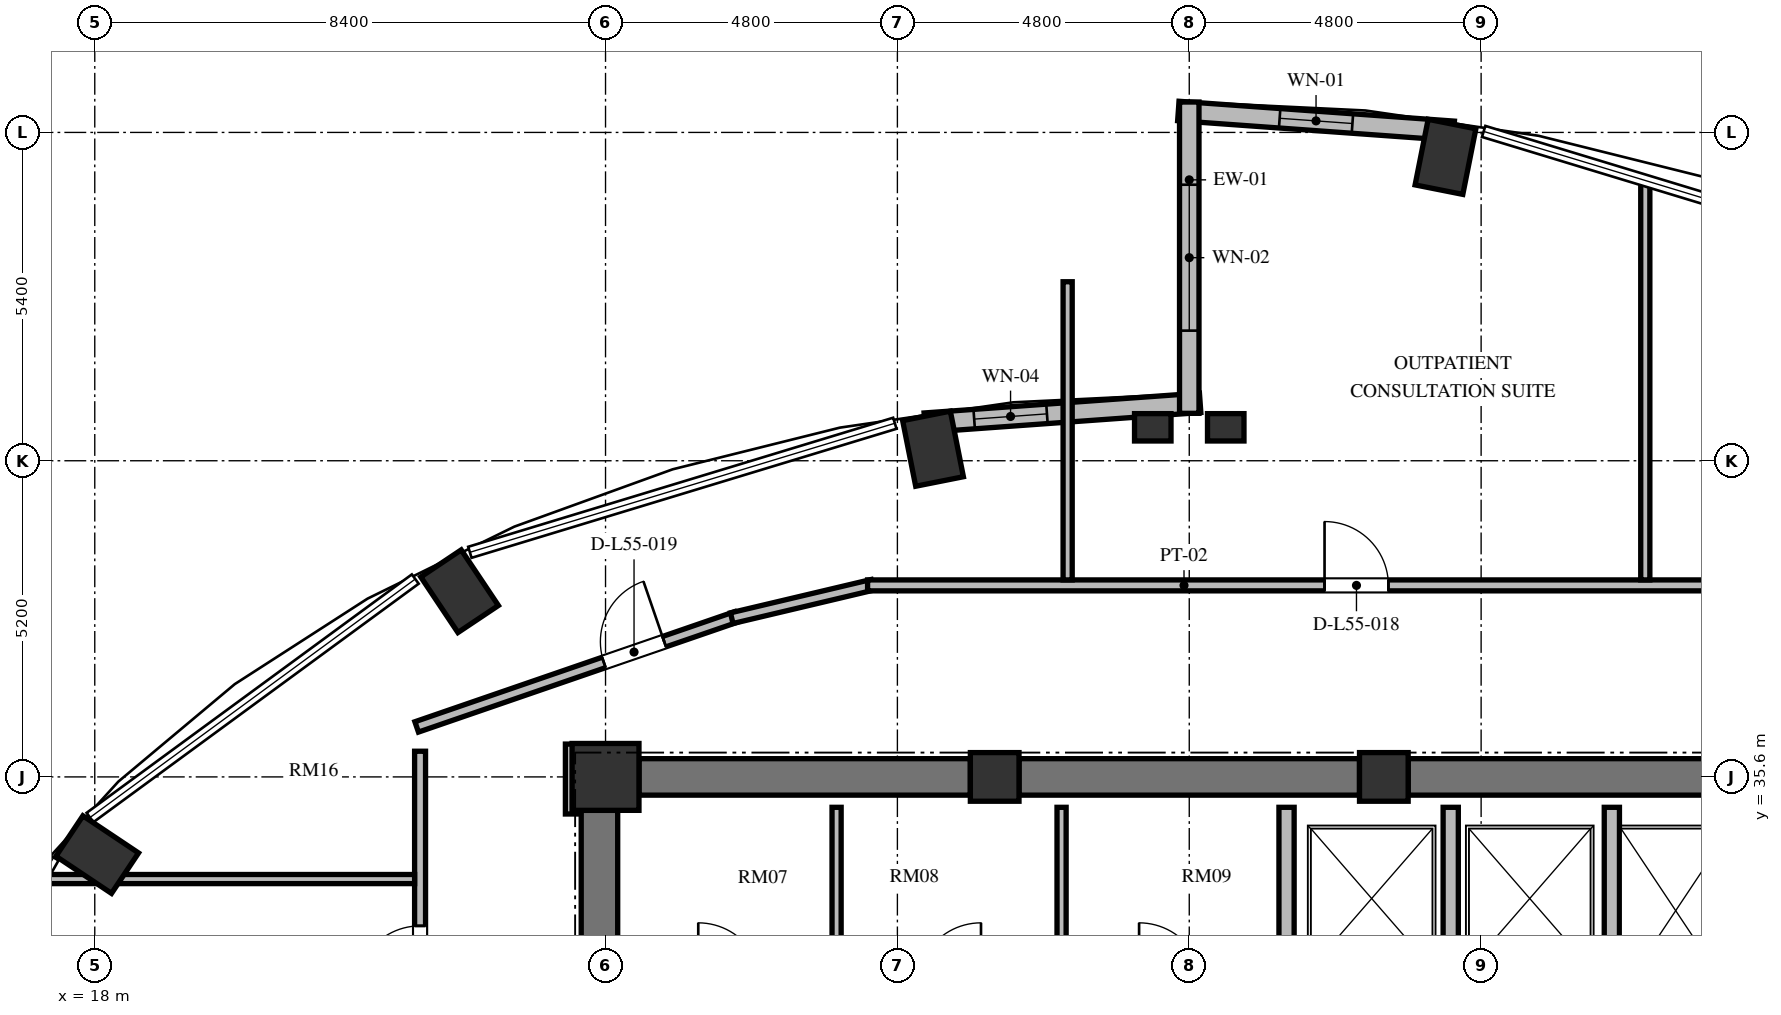
"""IFC4 building model, lengths in metres.
Left out: names, types, materials, properties, quantities, classifications, styles, units other than length and angle.
Written with IfcOpenShell. Run it as: python <this file> out.ifc"""

import sys

from ifc_helpers import new_model, si_unit, direction, frame, frame_2d, origin, origin_2d, place, context, subcontext, project, spatial, rectangle, extrude, element, fill, save


model = new_model("IFC4")
c1 = context("Model", 3, precision=1e-05, world=origin(), true_north=direction((0.0, 1.0)))
c2 = subcontext(c1, "Body", "Model", "MODEL_VIEW")
j1 = project(units=[si_unit("LENGTHUNIT", "METRE"), si_unit("PLANEANGLEUNIT", "RADIAN")], contexts=[c1])
p1 = place(None, origin())
s1 = spatial("IfcSite", under=j1, at=p1, CompositionType="ELEMENT")
p2 = place(p1, origin())
s2 = spatial("IfcBuilding", under=s1, at=p2, CompositionType="ELEMENT")
p3 = place(p2, frame((0.0, 0.0, 213.072)))
s3 = spatial("IfcBuildingStorey", under=s2, at=p3, CompositionType="ELEMENT", Elevation=213.072)
for number, where, z_axis, x_axis in (
    (1, (40.214, 45.798, 0.0), (0.0, 0.0, 1.0), (0.195, 0.981, 0.0)),
    (2, (31.786, 40.998, 0.0), (0.0, 0.0, 1.0), (-0.195, 0.981, 0.0)),
    (3, (24.0, 38.654, 0.0), (0.0, 0.0, 1.0), (-0.556, 0.831, 0.0)),
    (4, (18.04, 34.323, 0.0), (0.0, 0.0, 1.0), (-0.831, 0.556, 0.0)),
):
    element("IfcColumn", number, at=place(p3, frame(where, z_axis=z_axis, x_axis=x_axis)), inside=s3, PredefinedType="COLUMN", context=c2, shape_type="SweptSolid", body=[
        extrude(rectangle(XDim=1.1, YDim=0.8, at=origin_2d()), origin(), (0.0, 0.0, 1.0), 3.648),
    ])
for number, where, z_axis, x_axis in (
    (5, (39.2, 35.6, 0.0), (0.0, 0.0, 1.0), (1.0, 0.0, 0.0)),
    (6, (32.8, 35.6, 0.0), (0.0, 0.0, 1.0), (1.0, 0.0, 0.0)),
):
    element("IfcColumn", number, at=place(p3, frame(where, z_axis=z_axis, x_axis=x_axis)), inside=s3, PredefinedType="COLUMN", context=c2, shape_type="SweptSolid", body=[
        extrude(rectangle(XDim=0.8, YDim=0.8, at=origin_2d()), origin(), (0.0, 0.0, 1.0), 3.648),
    ])
p4 = place(p3, frame((26.4, 35.6, 0.0), z_axis=(0.0, 0.0, 1.0), x_axis=(1.0, 0.0, 0.0)))
e7 = element("IfcColumn", 7, at=p4, inside=s3, PredefinedType="COLUMN", context=c2, shape_type="SweptSolid", body=[
    extrude(rectangle(XDim=1.1, YDim=1.1, at=origin_2d()), origin(), (0.0, 0.0, 1.0), 3.648),
])
for number, where, z_axis, x_axis in (
    (8, (35.4, 41.35, 0.0), (0.0, 0.0, 1.0), (1.0, 0.0, 0.0)),
    (9, (36.6, 41.35, 0.0), (0.0, 0.0, 1.0), (1.0, 0.0, 0.0)),
):
    element("IfcColumn", number, at=place(p3, frame(where, z_axis=z_axis, x_axis=x_axis)), inside=s3, PredefinedType="PILASTER", context=c2, shape_type="SweptSolid", body=[
        extrude(rectangle(XDim=0.6, YDim=0.45, at=origin_2d()), origin(), (0.0, 0.0, 1.0), 3.648),
    ])
p5 = place(p3, frame((26.3, 20.95, 0.0), z_axis=(0.0, 0.0, 1.0), x_axis=(0.0, 1.0, 0.0)))
e10 = element("IfcWall", 10, at=p5, inside=s3, PredefinedType="SHEAR", context=c2, shape_type="SweptSolid", body=[
    extrude(rectangle(XDim=14.1, YDim=0.6, at=frame_2d((7.05, 0.0))), origin(), (0.0, 0.0, 1.0), 3.648),
])
p6 = place(p5, frame((6.5, 0.0, 0.0)))
e11 = element("IfcOpeningElement", 11, at=p6, cuts=e10, PredefinedType="OPENING", context=c2, shape_type="SweptSolid", body=[
    extrude(rectangle(XDim=1.2, YDim=2.15, at=frame_2d((0.6, 1.075))), frame((0.0, 0.31, 0.0), z_axis=(0.0, -1.0, 0.0), x_axis=(1.0, 0.0, 0.0)), (0.0, 0.0, 1.0), 0.62),
])
p7 = place(p5, frame((9.6, 0.0, 0.0)))
e12 = element("IfcOpeningElement", 12, at=p7, cuts=e10, PredefinedType="OPENING", context=c2, shape_type="SweptSolid", body=[
    extrude(rectangle(XDim=1.3, YDim=2.2, at=frame_2d((0.65, 1.1))), frame((0.0, 0.31, 0.0), z_axis=(0.0, -1.0, 0.0), x_axis=(1.0, 0.0, 0.0)), (0.0, 0.0, 1.0), 0.62),
])
p8 = place(p5, frame((3.26, 0.0, 0.0)))
e13 = element("IfcOpeningElement", 13, at=p8, cuts=e10, PredefinedType="OPENING", context=c2, shape_type="SweptSolid", body=[
    extrude(rectangle(XDim=1.3, YDim=2.2, at=frame_2d((0.65, 1.1))), frame((0.0, 0.31, 0.0), z_axis=(0.0, -1.0, 0.0), x_axis=(1.0, 0.0, 0.0)), (0.0, 0.0, 1.0), 0.62),
])
p9 = place(p3, frame((26.95, 35.6, 0.0), z_axis=(0.0, 0.0, 1.0), x_axis=(1.0, 0.0, 0.0)))
e14 = element("IfcWall", 14, at=p9, inside=s3, PredefinedType="SHEAR", context=c2, shape_type="SweptSolid", body=[
    extrude(rectangle(XDim=5.45, YDim=0.6, at=frame_2d((2.725, 0.0))), origin(), (0.0, 0.0, 1.0), 3.648),
])
p10 = place(p3, frame((33.2, 35.6, 0.0), z_axis=(0.0, 0.0, 1.0), x_axis=(1.0, 0.0, 0.0)))
e15 = element("IfcWall", 15, at=p10, inside=s3, PredefinedType="SHEAR", context=c2, shape_type="SweptSolid", body=[
    extrude(rectangle(XDim=5.6, YDim=0.6, at=frame_2d((2.8, 0.0))), origin(), (0.0, 0.0, 1.0), 3.648),
])
p11 = place(p3, frame((39.6, 35.6, 0.0), z_axis=(0.0, 0.0, 1.0), x_axis=(1.0, 0.0, 0.0)))
e16 = element("IfcWall", 16, at=p11, inside=s3, PredefinedType="SHEAR", context=c2, shape_type="SweptSolid", body=[
    extrude(rectangle(XDim=5.45, YDim=0.6, at=frame_2d((2.725, 0.0))), origin(), (0.0, 0.0, 1.0), 3.648),
])
p12 = place(p3, frame((40.35, 46.226, 0.0), z_axis=(0.0, 0.0, 1.0), x_axis=(-0.997409061056, 0.071938619141, 0.0)))
e17 = element("IfcWall", 17, at=p12, inside=s3, PredefinedType="SOLIDWALL", context=c2, shape_type="SweptSolid", body=[
    extrude(rectangle(XDim=4.541, YDim=0.32, at=frame_2d((2.271, 0.0))), origin(), (0.0, 0.0, 1.0), 3.448),
])
p13 = place(p12, frame((1.67, 0.0, 0.85)))
e18 = element("IfcOpeningElement", 18, at=p13, cuts=e17, PredefinedType="OPENING", context=c2, shape_type="SweptSolid", body=[
    extrude(rectangle(XDim=1.2, YDim=2.2, at=frame_2d((0.6, 1.1))), frame((0.0, 0.17, 0.0), z_axis=(0.0, -1.0, 0.0), x_axis=(1.0, 0.0, 0.0)), (0.0, 0.0, 1.0), 0.34),
])
p14 = place(p3, frame((36.179, 41.753, 0.0), z_axis=(0.0, 0.0, 1.0), x_axis=(-0.997408782787, -0.071942477163, 0.0)))
e19 = element("IfcWall", 19, at=p14, inside=s3, PredefinedType="SOLIDWALL", context=c2, shape_type="SweptSolid", body=[
    extrude(rectangle(XDim=4.541, YDim=0.32, at=frame_2d((2.27, 0.0))), origin(), (0.0, 0.0, 1.0), 3.448),
])
p15 = place(p14, frame((2.526, 0.0, 0.85)))
e20 = element("IfcOpeningElement", 20, at=p15, cuts=e19, PredefinedType="OPENING", context=c2, shape_type="SweptSolid", body=[
    extrude(rectangle(XDim=1.2, YDim=1.8, at=frame_2d((0.6, 0.9))), frame((0.0, 0.17, 0.0), z_axis=(0.0, -1.0, 0.0), x_axis=(1.0, 0.0, 0.0)), (0.0, 0.0, 1.0), 0.34),
])
p16 = place(p3, frame((36.0, 46.7, 0.0), z_axis=(0.0, 0.0, 1.0), x_axis=(0.0, -1.0, 0.0)))
e21 = element("IfcWall", 21, at=p16, inside=s3, PredefinedType="SOLIDWALL", context=c2, shape_type="SweptSolid", body=[
    extrude(rectangle(XDim=5.12, YDim=0.32, at=frame_2d((2.56, 0.0))), origin(), (0.0, 0.0, 1.0), 3.448),
])
p17 = place(p16, frame((1.36, 0.0, 0.84)))
e22 = element("IfcOpeningElement", 22, at=p17, cuts=e21, PredefinedType="OPENING", context=c2, shape_type="SweptSolid", body=[
    extrude(rectangle(XDim=2.4, YDim=2.04, at=frame_2d((1.2, 1.02))), frame((0.0, 0.17, 0.0), z_axis=(0.0, -1.0, 0.0), x_axis=(1.0, 0.0, 0.0)), (0.0, 0.0, 1.0), 0.34),
])
p18 = place(p3, frame((42.95, 31.92, 0.0), z_axis=(0.0, 0.0, 1.0), x_axis=(0.0, 1.0, 0.0)))
e23 = element("IfcWall", 23, at=p18, inside=s3, PredefinedType="SOLIDWALL", context=c2, shape_type="SweptSolid", body=[
    extrude(rectangle(XDim=3.18, YDim=0.25, at=frame_2d((1.59, 0.0))), origin(), (0.0, 0.0, 1.0), 3.448),
])
for number, where, z_axis, x_axis in (
    (24, (37.6, 32.42, 0.0), (0.0, 0.0, 1.0), (0.0, 1.0, 0.0)),
    (25, (40.3, 32.42, 0.0), (0.0, 0.0, 1.0), (0.0, 1.0, 0.0)),
):
    element("IfcWall", number, at=place(p3, frame(where, z_axis=z_axis, x_axis=x_axis)), inside=s3, PredefinedType="SOLIDWALL", context=c2, shape_type="SweptSolid", body=[
        extrude(rectangle(XDim=2.68, YDim=0.25, at=frame_2d((1.34, 0.0))), origin(), (0.0, 0.0, 1.0), 3.448),
    ])
for number, where, z_axis, x_axis in (
    (26, (30.2, 32.42, 0.0), (0.0, 0.0, 1.0), (0.0, 1.0, 0.0)),
    (27, (33.9, 32.42, 0.0), (0.0, 0.0, 1.0), (0.0, 1.0, 0.0)),
):
    element("IfcWall", number, at=place(p3, frame(where, z_axis=z_axis, x_axis=x_axis)), inside=s3, PredefinedType="PARTITIONING", context=c2, shape_type="SweptSolid", body=[
        extrude(rectangle(XDim=2.68, YDim=0.15, at=frame_2d((1.34, 0.0))), origin(), (0.0, 0.0, 1.0), 3.448),
    ])
p19 = place(p3, frame((23.294, 36.422, 0.0), z_axis=(0.0, 0.0, 1.0), x_axis=(0.945493277461, 0.325641616316, 0.0)))
e28 = element("IfcWall", 28, at=p19, inside=s3, PredefinedType="PARTITIONING", context=c2, shape_type="SweptSolid", body=[
    extrude(rectangle(XDim=5.562, YDim=0.18, at=frame_2d((2.781, 0.0))), origin(), (0.0, 0.0, 1.0), 3.073),
])
p20 = place(p19, frame((3.256, 0.0, 0.0)))
e29 = element("IfcOpeningElement", 29, at=p20, cuts=e28, PredefinedType="OPENING", context=c2, shape_type="SweptSolid", body=[
    extrude(rectangle(XDim=1.05, YDim=2.15, at=frame_2d((0.525, 1.075))), frame((0.0, 0.1, 0.0), z_axis=(0.0, -1.0, 0.0), x_axis=(1.0, 0.0, 0.0)), (0.0, 0.0, 1.0), 0.2),
])
p21 = place(p3, frame((28.476, 38.211, 0.0), z_axis=(0.0, 0.0, 1.0), x_axis=(0.973030562203, 0.230676234189, 0.0)))
e30 = element("IfcWall", 30, at=p21, inside=s3, PredefinedType="PARTITIONING", context=c2, shape_type="SweptSolid", body=[
    extrude(rectangle(XDim=2.377, YDim=0.18, at=frame_2d((1.188, 0.0))), origin(), (0.0, 0.0, 1.0), 3.448),
])
p22 = place(p3, frame((30.71, 38.75, 0.0), z_axis=(0.0, 0.0, 1.0), x_axis=(1.0, 0.0, 0.0)))
e31 = element("IfcWall", 31, at=p22, inside=s3, PredefinedType="PARTITIONING", context=c2, shape_type="SweptSolid", body=[
    extrude(rectangle(XDim=20.815, YDim=0.18, at=frame_2d((10.408, 0.0))), origin(), (0.0, 0.0, 1.0), 3.073),
])
p23 = place(p22, frame((7.515, 0.0, 0.0)))
e32 = element("IfcOpeningElement", 32, at=p23, cuts=e31, PredefinedType="OPENING", context=c2, shape_type="SweptSolid", body=[
    extrude(rectangle(XDim=1.05, YDim=2.15, at=frame_2d((0.525, 1.075))), frame((0.0, 0.1, 0.0), z_axis=(0.0, -1.0, 0.0), x_axis=(1.0, 0.0, 0.0)), (0.0, 0.0, 1.0), 0.2),
])
p24 = place(p3, frame((25.83, 36.14, 0.0), z_axis=(0.0, 0.0, 1.0), x_axis=(0.0, -1.0, 0.0)))
e33 = element("IfcWall", 33, at=p24, inside=s3, PredefinedType="PARTITIONING", context=c2, shape_type="SweptSolid", body=[
    extrude(rectangle(XDim=1.15, YDim=0.18, at=frame_2d((0.575, 0.0))), origin(), (0.0, 0.0, 1.0), 3.448),
])
p25 = place(p3, frame((23.35, 19.98, 0.0), z_axis=(0.0, 0.0, 1.0), x_axis=(0.0, 1.0, 0.0)))
e34 = element("IfcWall", 34, at=p25, inside=s3, PredefinedType="PARTITIONING", context=c2, shape_type="SweptSolid", body=[
    extrude(rectangle(XDim=16.042, YDim=0.18, at=frame_2d((8.021, 0.0))), origin(), (0.0, 0.0, 1.0), 3.448),
])
p26 = place(p25, frame((6.975, 0.0, 0.0)))
e35 = element("IfcOpeningElement", 35, at=p26, cuts=e34, PredefinedType="OPENING", context=c2, shape_type="SweptSolid", body=[
    extrude(rectangle(XDim=1.05, YDim=2.15, at=frame_2d((0.525, 1.075))), frame((0.0, 0.1, 0.0), z_axis=(0.0, -1.0, 0.0), x_axis=(1.0, 0.0, 0.0)), (0.0, 0.0, 1.0), 0.2),
])
p27 = place(p25, frame((4.353, 0.0, 0.0)))
e36 = element("IfcOpeningElement", 36, at=p27, cuts=e34, PredefinedType="OPENING", context=c2, shape_type="SweptSolid", body=[
    extrude(rectangle(XDim=1.05, YDim=2.15, at=frame_2d((0.525, 1.075))), frame((0.0, 0.1, 0.0), z_axis=(0.0, -1.0, 0.0), x_axis=(1.0, 0.0, 0.0)), (0.0, 0.0, 1.0), 0.2),
])
p28 = place(p25, frame((12.12, 0.0, 0.0)))
e37 = element("IfcOpeningElement", 37, at=p28, cuts=e34, PredefinedType="OPENING", context=c2, shape_type="SweptSolid", body=[
    extrude(rectangle(XDim=1.05, YDim=2.15, at=frame_2d((0.525, 1.075))), frame((0.0, 0.1, 0.0), z_axis=(0.0, -1.0, 0.0), x_axis=(1.0, 0.0, 0.0)), (0.0, 0.0, 1.0), 0.2),
])
p29 = place(p25, frame((9.537, 0.0, 0.0)))
e38 = element("IfcOpeningElement", 38, at=p29, cuts=e34, PredefinedType="OPENING", context=c2, shape_type="SweptSolid", body=[
    extrude(rectangle(XDim=1.05, YDim=2.15, at=frame_2d((0.525, 1.075))), frame((0.0, 0.1, 0.0), z_axis=(0.0, -1.0, 0.0), x_axis=(1.0, 0.0, 0.0)), (0.0, 0.0, 1.0), 0.2),
])
p30 = place(p3, frame((17.132, 33.92, 0.0), z_axis=(0.0, 0.0, 1.0), x_axis=(1.0, 0.0, 0.0)))
e39 = element("IfcWall", 39, at=p30, inside=s3, PredefinedType="PARTITIONING", context=c2, shape_type="SweptSolid", body=[
    extrude(rectangle(XDim=6.128, YDim=0.15, at=frame_2d((3.064, 0.0))), origin(), (0.0, 0.0, 1.0), 3.448),
])
p31 = place(p3, frame((34.0, 38.84, 0.0), z_axis=(0.0, 0.0, 1.0), x_axis=(0.0, 1.0, 0.0)))
e40 = element("IfcWall", 40, at=p31, inside=s3, PredefinedType="PARTITIONING", context=c2, shape_type="SweptSolid", body=[
    extrude(rectangle(XDim=4.904, YDim=0.15, at=frame_2d((2.452, 0.0))), origin(), (0.0, 0.0, 1.0), 3.448),
])
p32 = place(p3, frame((43.5, 38.84, 0.0), z_axis=(0.0, 0.0, 1.0), x_axis=(0.0, 1.0, 0.0)))
e41 = element("IfcWall", 41, at=p32, inside=s3, PredefinedType="PARTITIONING", context=c2, shape_type="SweptSolid", body=[
    extrude(rectangle(XDim=6.552, YDim=0.15, at=frame_2d((3.276, 0.0))), origin(), (0.0, 0.0, 1.0), 3.448),
])
p33 = place(p13, origin())
e42 = element("IfcWindow", 42, at=p33, inside=s3, PartitioningType="SINGLE_PANEL", PredefinedType="WINDOW", context=c2, shape_type="SweptSolid", body=[
    extrude(rectangle(XDim=1.2, YDim=2.2, at=frame_2d((0.6, 1.1))), frame((0.0, 0.03, 0.0), z_axis=(0.0, -1.0, 0.0), x_axis=(1.0, 0.0, 0.0)), (0.0, 0.0, 1.0), 0.06),
])
fill(e18, e42)
p34 = place(p15, origin())
e43 = element("IfcWindow", 43, at=p34, inside=s3, PartitioningType="SINGLE_PANEL", PredefinedType="WINDOW", context=c2, shape_type="SweptSolid", body=[
    extrude(rectangle(XDim=1.2, YDim=1.8, at=frame_2d((0.6, 0.9))), frame((0.0, 0.03, 0.0), z_axis=(0.0, -1.0, 0.0), x_axis=(1.0, 0.0, 0.0)), (0.0, 0.0, 1.0), 0.06),
])
fill(e20, e43)
p35 = place(p17, origin())
e44 = element("IfcWindow", 44, at=p35, inside=s3, PartitioningType="SINGLE_PANEL", PredefinedType="WINDOW", context=c2, shape_type="SweptSolid", body=[
    extrude(rectangle(XDim=2.4, YDim=2.04, at=frame_2d((1.2, 1.02))), frame((0.0, 0.03, 0.0), z_axis=(0.0, -1.0, 0.0), x_axis=(1.0, 0.0, 0.0)), (0.0, 0.0, 1.0), 0.06),
])
fill(e22, e44)
p36 = place(p23, origin())
e45 = element("IfcDoor", 45, at=p36, inside=s3, OperationType="SINGLE_SWING_LEFT", PredefinedType="DOOR", context=c2, shape_type="SweptSolid", body=[
    extrude(rectangle(XDim=1.05, YDim=2.15, at=frame_2d((0.525, 1.075))), frame((0.0, 0.025, 0.0), z_axis=(0.0, -1.0, 0.0), x_axis=(1.0, 0.0, 0.0)), (0.0, 0.0, 1.0), 0.05),
])
fill(e32, e45)
p37 = place(p20, origin())
e46 = element("IfcDoor", 46, at=p37, inside=s3, OperationType="SINGLE_SWING_RIGHT", PredefinedType="DOOR", context=c2, shape_type="SweptSolid", body=[
    extrude(rectangle(XDim=1.05, YDim=2.15, at=frame_2d((0.525, 1.075))), frame((0.0, 0.025, 0.0), z_axis=(0.0, -1.0, 0.0), x_axis=(1.0, 0.0, 0.0)), (0.0, 0.0, 1.0), 0.05),
])
fill(e29, e46)
p38 = place(p28, origin())
e47 = element("IfcDoor", 47, at=p38, inside=s3, OperationType="SINGLE_SWING_LEFT", PredefinedType="DOOR", context=c2, shape_type="SweptSolid", body=[
    extrude(rectangle(XDim=1.05, YDim=2.15, at=frame_2d((0.525, 1.075))), frame((0.0, 0.025, 0.0), z_axis=(0.0, -1.0, 0.0), x_axis=(1.0, 0.0, 0.0)), (0.0, 0.0, 1.0), 0.05),
])
fill(e37, e47)
save(model, sys.argv[1])
